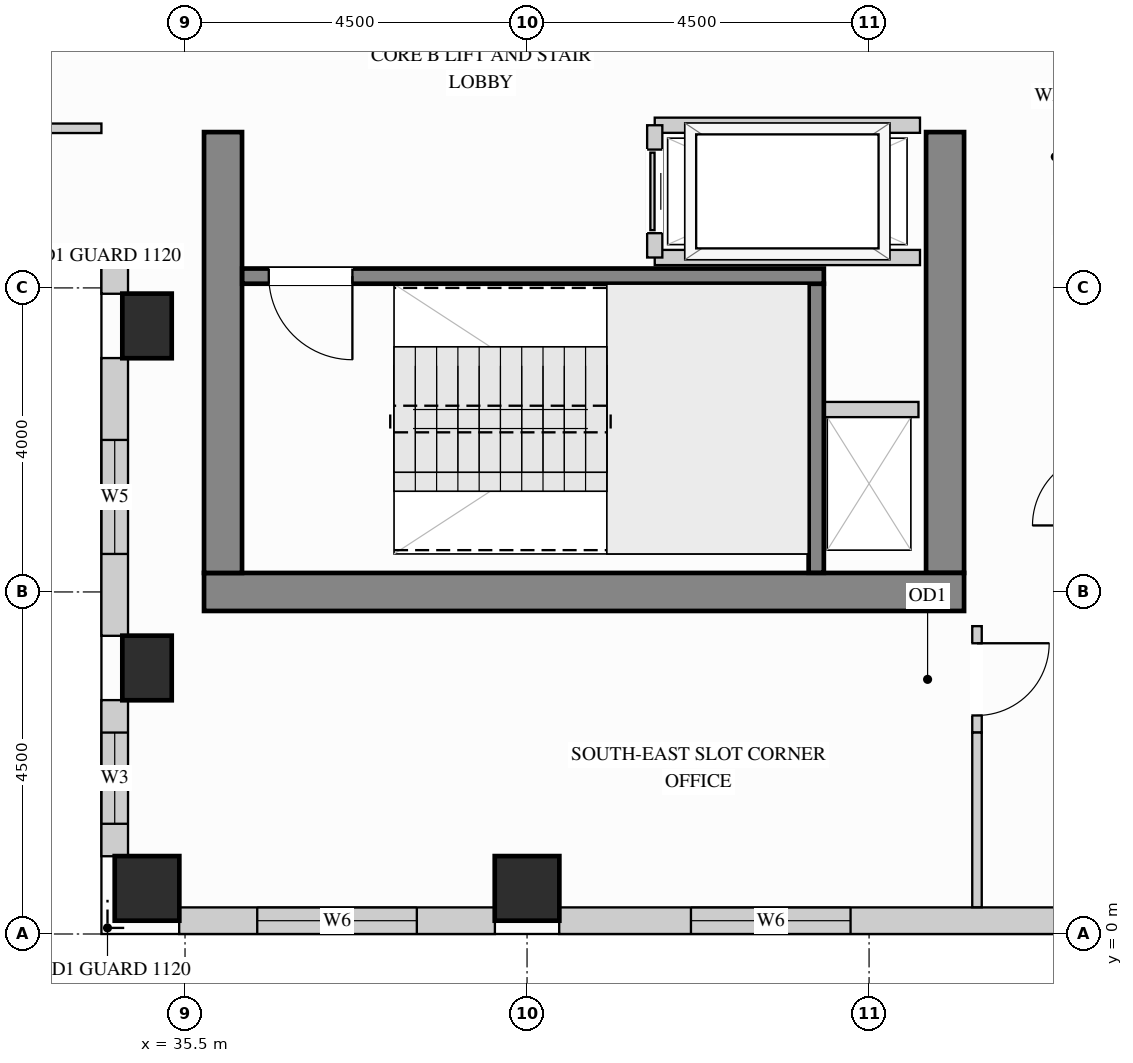
"""IFC4 building model, lengths in metres.
Left out: names, types, materials, properties, quantities, classifications, styles, units other than length and angle.
Written with IfcOpenShell. Run it as: python <this file> out.ifc"""

import sys

from ifc_helpers import new_model, si_unit, direction, frame, frame_2d, origin, origin_2d, place, context, subcontext, project, spatial, rectangle, extrude, source, transform, mapped, element, fill, save


model = new_model("IFC4")
c1 = context("Model", 3, precision=1e-05, world=origin(), true_north=direction((0.0, 1.0)))
c2 = subcontext(c1, "Body", "Model", "MODEL_VIEW")
j1 = project(units=[si_unit("LENGTHUNIT", "METRE"), si_unit("PLANEANGLEUNIT", "RADIAN")], contexts=[c1])
p1 = place(None, origin())
s1 = spatial("IfcSite", under=j1, at=p1, CompositionType="ELEMENT")
p2 = place(p1, origin())
s2 = spatial("IfcBuilding", under=s1, at=p2, CompositionType="ELEMENT")
p3 = place(p2, frame((0.0, 0.0, 241.2)))
s3 = spatial("IfcBuildingStorey", under=s2, at=p3, CompositionType="ELEMENT", Elevation=241.2)
m1 = source(origin(), c2, "Body", "SweptSolid", [
    extrude(rectangle(XDim=0.65, YDim=0.85, at=origin_2d()), origin(), (0.0, 0.0, 1.0), 3.4),
])
for number, where, z_axis, x_axis in (
    (1, (35.0, 3.5, 0.0), (0.0, 0.0, 1.0), (1.0, 0.0, 0.0)),
    (2, (35.0, 8.0, 0.0), (0.0, 0.0, 1.0), (1.0, 0.0, 0.0)),
):
    element("IfcColumn", number, at=place(p3, frame(where, z_axis=z_axis, x_axis=x_axis)), inside=s3, PredefinedType="COLUMN", context=c2, shape_type="MappedRepresentation", body=[
        mapped(m1, transform((0.0, 0.0, 0.0), x_axis=(1.0, 0.0, 0.0), y_axis=(0.0, 1.0, 0.0), z_axis=(0.0, 0.0, 1.0))),
    ])
m2 = source(origin(), c2, "Body", "SweptSolid", [
    extrude(rectangle(XDim=0.85, YDim=0.85, at=origin_2d()), origin(), (0.0, 0.0, 1.0), 3.4),
])
for number, where, z_axis, x_axis in (
    (3, (35.0, 0.6, 0.0), (0.0, 0.0, 1.0), (1.0, 0.0, 0.0)),
    (4, (40.0, 0.6, 0.0), (0.0, 0.0, 1.0), (1.0, 0.0, 0.0)),
):
    element("IfcColumn", number, at=place(p3, frame(where, z_axis=z_axis, x_axis=x_axis)), inside=s3, PredefinedType="COLUMN", context=c2, shape_type="MappedRepresentation", body=[
        mapped(m2, transform((0.0, 0.0, 0.0), x_axis=(1.0, 0.0, 0.0), y_axis=(0.0, 1.0, 0.0), z_axis=(0.0, 0.0, 1.0))),
    ])
m3 = source(origin(), c2, "Body", "SweptSolid", [
    extrude(rectangle(XDim=5.8, YDim=0.5, at=frame_2d((2.9, 0.0))), origin(), (0.0, 0.0, 1.0), 3.4),
])
p4 = place(p3, frame((45.5, 4.75, 0.0), z_axis=(0.0, 0.0, 1.0), x_axis=(0.0, 1.0, 0.0)))
e5 = element("IfcWall", 5, at=p4, inside=s3, PredefinedType="SHEAR", context=c2, shape_type="MappedRepresentation", body=[
    mapped(m3, transform((0.0, 0.0, 0.0), x_axis=(1.0, 0.0, 0.0), y_axis=(0.0, 1.0, 0.0), z_axis=(0.0, 0.0, 1.0))),
])
m4 = source(origin(), c2, "Body", "SweptSolid", [
    extrude(rectangle(XDim=10.0, YDim=0.5, at=frame_2d((5.0, 0.0))), origin(), (0.0, 0.0, 1.0), 3.4),
])
p5 = place(p3, frame((35.75, 4.5, 0.0), z_axis=(0.0, 0.0, 1.0), x_axis=(1.0, 0.0, 0.0)))
e6 = element("IfcWall", 6, at=p5, inside=s3, PredefinedType="SHEAR", context=c2, shape_type="MappedRepresentation", body=[
    mapped(m4, transform((0.0, 0.0, 0.0), x_axis=(1.0, 0.0, 0.0), y_axis=(0.0, 1.0, 0.0), z_axis=(0.0, 0.0, 1.0))),
])
p6 = place(p3, frame((36.0, 4.75, 0.0), z_axis=(0.0, 0.0, 1.0), x_axis=(0.0, 1.0, 0.0)))
e7 = element("IfcWall", 7, at=p6, inside=s3, PredefinedType="SHEAR", context=c2, shape_type="MappedRepresentation", body=[
    mapped(m3, transform((0.0, 0.0, 0.0), x_axis=(1.0, 0.0, 0.0), y_axis=(0.0, 1.0, 0.0), z_axis=(0.0, 0.0, 1.0))),
])
m5 = source(origin(), c2, "Body", "SweptSolid", [
    extrude(rectangle(XDim=0.379, YDim=0.35, at=frame_2d((0.189, 0.0))), origin(), (0.0, 0.0, 1.0), 3.385),
])
p7 = place(p3, frame((34.575, 8.802, 0.0), z_axis=(0.0, 0.0, 1.0), x_axis=(0.0, -1.0, 0.0)))
e8 = element("IfcWall", 8, at=p7, inside=s3, PredefinedType="SOLIDWALL", context=c2, shape_type="MappedRepresentation", body=[
    mapped(m5, transform((0.0, 0.0, 0.0), x_axis=(1.0, 0.0, 0.0), y_axis=(0.0, 1.0, 0.0), z_axis=(0.0, 0.0, 1.0))),
])
p8 = place(p3, frame((34.575, 7.577, 0.0), z_axis=(0.0, 0.0, 1.0), x_axis=(0.0, -1.0, 0.0)))
e9 = element("IfcWall", 9, at=p8, inside=s3, PredefinedType="SOLIDWALL", context=c2, shape_type="SweptSolid", body=[
    extrude(rectangle(XDim=3.654, YDim=0.35, at=frame_2d((1.827, 0.0))), origin(), (0.0, 0.0, 1.0), 3.385),
])
p9 = place(p8, frame((1.077, 0.0, 0.78)))
e10 = element("IfcOpeningElement", 10, at=p9, cuts=e9, PredefinedType="OPENING", context=c2, shape_type="SweptSolid", body=[
    extrude(rectangle(XDim=1.5, YDim=2.0, at=frame_2d((0.75, 1.0))), frame((0.0, 0.185, 0.0), z_axis=(0.0, -1.0, 0.0), x_axis=(1.0, 0.0, 0.0)), (0.0, 0.0, 1.0), 0.37),
])
p10 = place(p3, frame((34.575, 3.077, 0.0), z_axis=(0.0, 0.0, 1.0), x_axis=(0.0, -1.0, 0.0)))
e11 = element("IfcWall", 11, at=p10, inside=s3, PredefinedType="SOLIDWALL", context=c2, shape_type="SweptSolid", body=[
    extrude(rectangle(XDim=2.054, YDim=0.35, at=frame_2d((1.027, 0.0))), origin(), (0.0, 0.0, 1.0), 3.385),
])
p11 = place(p10, frame((0.427, 0.0, 0.78)))
e12 = element("IfcOpeningElement", 12, at=p11, cuts=e11, PredefinedType="OPENING", context=c2, shape_type="SweptSolid", body=[
    extrude(rectangle(XDim=1.2, YDim=2.0, at=frame_2d((0.6, 1.0))), frame((0.0, 0.185, 0.0), z_axis=(0.0, -1.0, 0.0), x_axis=(1.0, 0.0, 0.0)), (0.0, 0.0, 1.0), 0.37),
])
p12 = place(p3, frame((35.423, 0.175, 0.0), z_axis=(0.0, 0.0, 1.0), x_axis=(1.0, 0.0, 0.0)))
e13 = element("IfcWall", 13, at=p12, inside=s3, PredefinedType="SOLIDWALL", context=c2, shape_type="SweptSolid", body=[
    extrude(rectangle(XDim=4.154, YDim=0.35, at=frame_2d((2.077, 0.0))), origin(), (0.0, 0.0, 1.0), 3.385),
])
p13 = place(p12, frame((1.027, 0.0, 0.78)))
e14 = element("IfcOpeningElement", 14, at=p13, cuts=e13, PredefinedType="OPENING", context=c2, shape_type="SweptSolid", body=[
    extrude(rectangle(XDim=2.1, YDim=2.25, at=frame_2d((1.05, 1.125))), frame((0.0, 0.185, 0.0), z_axis=(0.0, -1.0, 0.0), x_axis=(1.0, 0.0, 0.0)), (0.0, 0.0, 1.0), 0.37),
])
p14 = place(p3, frame((40.423, 0.175, 0.0), z_axis=(0.0, 0.0, 1.0), x_axis=(1.0, 0.0, 0.0)))
e15 = element("IfcWall", 15, at=p14, inside=s3, PredefinedType="SOLIDWALL", context=c2, shape_type="SweptSolid", body=[
    extrude(rectangle(XDim=7.077, YDim=0.35, at=frame_2d((3.539, 0.0))), origin(), (0.0, 0.0, 1.0), 3.385),
])
p15 = place(p14, frame((1.733, 0.0, 0.78)))
e16 = element("IfcOpeningElement", 16, at=p15, cuts=e15, PredefinedType="OPENING", context=c2, shape_type="SweptSolid", body=[
    extrude(rectangle(XDim=2.1, YDim=2.25, at=frame_2d((1.05, 1.125))), frame((0.0, 0.185, 0.0), z_axis=(0.0, -1.0, 0.0), x_axis=(1.0, 0.0, 0.0)), (0.0, 0.0, 1.0), 0.37),
])
p16 = place(p3, frame((45.92, 2.65, 0.0), z_axis=(0.0, 0.0, 1.0), x_axis=(0.0, 1.0, 0.0)))
e17 = element("IfcWall", 17, at=p16, inside=s3, PredefinedType="PARTITIONING", context=c2, shape_type="SweptSolid", body=[
    extrude(rectangle(XDim=1.4, YDim=0.125, at=frame_2d((0.7, 0.0))), origin(), (0.0, 0.0, 1.0), 3.385),
])
p17 = place(p16, frame((0.225, 0.0, 0.0)))
e18 = element("IfcOpeningElement", 18, at=p17, cuts=e17, PredefinedType="OPENING", context=c2, shape_type="SweptSolid", body=[
    extrude(rectangle(XDim=0.95, YDim=2.15, at=frame_2d((0.475, 1.075))), frame((0.0, 0.073, 0.0), z_axis=(0.0, -1.0, 0.0), x_axis=(1.0, 0.0, 0.0)), (0.0, 0.0, 1.0), 0.145),
])
m6 = source(origin(), c2, "Body", "SweptSolid", [
    extrude(rectangle(XDim=2.298, YDim=0.125, at=frame_2d((1.149, 0.0))), origin(), (0.0, 0.0, 1.0), 3.385),
])
p18 = place(p3, frame((45.92, 0.352, 0.0), z_axis=(0.0, 0.0, 1.0), x_axis=(0.0, 1.0, 0.0)))
e19 = element("IfcWall", 19, at=p18, inside=s3, PredefinedType="PARTITIONING", context=c2, shape_type="MappedRepresentation", body=[
    mapped(m6, transform((0.0, 0.0, 0.0), x_axis=(1.0, 0.0, 0.0), y_axis=(0.0, 1.0, 0.0), z_axis=(0.0, 0.0, 1.0))),
])
p19 = place(p3, frame((29.85, 10.6, 0.0), z_axis=(0.0, 0.0, 1.0), x_axis=(1.0, 0.0, 0.0)))
e20 = element("IfcWall", 20, at=p19, inside=s3, PredefinedType="PARTITIONING", context=c2, shape_type="SweptSolid", body=[
    extrude(rectangle(XDim=4.55, YDim=0.125, at=frame_2d((2.275, 0.0))), origin(), (0.0, 0.0, 1.0), 3.385),
])
p20 = place(p19, frame((1.8, 0.0, 0.0)))
e21 = element("IfcOpeningElement", 21, at=p20, cuts=e20, PredefinedType="OPENING", context=c2, shape_type="SweptSolid", body=[
    extrude(rectangle(XDim=0.95, YDim=2.15, at=frame_2d((0.475, 1.075))), frame((0.0, 0.073, 0.0), z_axis=(0.0, -1.0, 0.0), x_axis=(1.0, 0.0, 0.0)), (0.0, 0.0, 1.0), 0.145),
])
m7 = source(origin(), c2, "Body", "SweptSolid", [
    extrude(rectangle(XDim=1.3, YDim=0.2, at=frame_2d((0.65, 0.0))), origin(), (0.0, 0.0, 1.0), 3.385),
])
p21 = place(p3, frame((43.85, 6.9, 0.0), z_axis=(0.0, 0.0, 1.0), x_axis=(1.0, 0.0, 0.0)))
e22 = element("IfcWall", 22, at=p21, inside=s3, PredefinedType="PARTITIONING", context=c2, shape_type="MappedRepresentation", body=[
    mapped(m7, transform((0.0, 0.0, 0.0), x_axis=(1.0, 0.0, 0.0), y_axis=(0.0, 1.0, 0.0), z_axis=(0.0, 0.0, 1.0))),
])
m8 = source(origin(), c2, "Body", "SweptSolid", [
    extrude(rectangle(XDim=3.49, YDim=0.2, at=frame_2d((1.745, 0.0))), origin(), (0.0, 0.0, 1.0), 3.385),
])
for number, where, z_axis, x_axis in (
    (23, (41.68, 10.64, 0.0), (0.0, 0.0, 1.0), (1.0, 0.0, 0.0)),
    (24, (41.68, 8.9, 0.0), (0.0, 0.0, 1.0), (1.0, 0.0, 0.0)),
):
    element("IfcWall", number, at=place(p3, frame(where, z_axis=z_axis, x_axis=x_axis)), inside=s3, PredefinedType="PARTITIONING", context=c2, shape_type="MappedRepresentation", body=[
        mapped(m8, transform((0.0, 0.0, 0.0), x_axis=(1.0, 0.0, 0.0), y_axis=(0.0, 1.0, 0.0), z_axis=(0.0, 0.0, 1.0))),
    ])
p22 = place(p3, frame((41.68, 8.9, 0.0), z_axis=(0.0, 0.0, 1.0), x_axis=(0.0, 1.0, 0.0)))
e25 = element("IfcWall", 25, at=p22, inside=s3, PredefinedType="PARTITIONING", context=c2, shape_type="SweptSolid", body=[
    extrude(rectangle(XDim=1.74, YDim=0.2, at=frame_2d((0.87, 0.0))), origin(), (0.0, 0.0, 1.0), 3.385),
])
p23 = place(p22, frame((0.32, 0.0, 0.0)))
e26 = element("IfcOpeningElement", 26, at=p23, cuts=e25, PredefinedType="OPENING", context=c2, shape_type="SweptSolid", body=[
    extrude(rectangle(XDim=1.1, YDim=2.2, at=frame_2d((0.55, 1.1))), frame((0.0, 0.11, 0.0), z_axis=(0.0, -1.0, 0.0), x_axis=(1.0, 0.0, 0.0)), (0.0, 0.0, 1.0), 0.22),
])
m9 = source(origin(), c2, "Body", "SweptSolid", [
    extrude(rectangle(XDim=3.803, YDim=0.2, at=frame_2d((1.901, 0.0))), origin(), (0.0, 0.0, 1.0), 3.4),
])
p24 = place(p3, frame((43.805, 4.752, 0.0), z_axis=(0.0, 0.0, 1.0), x_axis=(0.0, 1.0, 0.0)))
e27 = element("IfcWall", 27, at=p24, inside=s3, PredefinedType="SHEAR", context=c2, shape_type="MappedRepresentation", body=[
    mapped(m9, transform((0.0, 0.0, 0.0), x_axis=(1.0, 0.0, 0.0), y_axis=(0.0, 1.0, 0.0), z_axis=(0.0, 0.0, 1.0))),
])
p25 = place(p3, frame((36.252, 8.655, 0.0), z_axis=(0.0, 0.0, 1.0), x_axis=(1.0, 0.0, 0.0)))
e28 = element("IfcWall", 28, at=p25, inside=s3, PredefinedType="SHEAR", context=c2, shape_type="SweptSolid", body=[
    extrude(rectangle(XDim=7.653, YDim=0.2, at=frame_2d((3.827, 0.0))), origin(), (0.0, 0.0, 1.0), 3.4),
])
p26 = place(p25, frame((0.35, 0.0, 0.0)))
e29 = element("IfcOpeningElement", 29, at=p26, cuts=e28, PredefinedType="OPENING", context=c2, shape_type="SweptSolid", body=[
    extrude(rectangle(XDim=1.1, YDim=2.15, at=frame_2d((0.55, 1.075))), frame((0.0, 0.11, 0.0), z_axis=(0.0, -1.0, 0.0), x_axis=(1.0, 0.0, 0.0)), (0.0, 0.0, 1.0), 0.22),
])
m10 = source(origin(), c2, "Body", "SweptSolid", [
    extrude(rectangle(XDim=1.1, YDim=2.2, at=frame_2d((0.55, 1.1))), frame((0.0, 0.025, 0.0), z_axis=(0.0, -1.0, 0.0), x_axis=(1.0, 0.0, 0.0)), (0.0, 0.0, 1.0), 0.05),
])
p27 = place(p23, origin())
e30 = element("IfcDoor", 30, at=p27, inside=s3, OperationType="SLIDING_TO_LEFT", PredefinedType="DOOR", context=c2, shape_type="MappedRepresentation", body=[
    mapped(m10, transform((0.0, 0.0, 0.0), x_axis=(1.0, 0.0, 0.0), y_axis=(0.0, 1.0, 0.0), z_axis=(0.0, 0.0, 1.0))),
])
fill(e26, e30)
m11 = source(origin(), c2, "Body", "SweptSolid", [
    extrude(rectangle(XDim=0.95, YDim=2.15, at=frame_2d((0.475, 1.075))), frame((0.0, 0.025, 0.0), z_axis=(0.0, -1.0, 0.0), x_axis=(1.0, 0.0, 0.0)), (0.0, 0.0, 1.0), 0.05),
])
p28 = place(p17, origin())
e31 = element("IfcDoor", 31, at=p28, inside=s3, OperationType="SINGLE_SWING_RIGHT", PredefinedType="DOOR", context=c2, shape_type="MappedRepresentation", body=[
    mapped(m11, transform((0.0, 0.0, 0.0), x_axis=(1.0, 0.0, 0.0), y_axis=(0.0, 1.0, 0.0), z_axis=(0.0, 0.0, 1.0))),
])
fill(e18, e31)
m12 = source(origin(), c2, "Body", "SweptSolid", [
    extrude(rectangle(XDim=1.1, YDim=2.15, at=frame_2d((0.55, 1.075))), frame((0.0, 0.025, 0.0), z_axis=(0.0, -1.0, 0.0), x_axis=(1.0, 0.0, 0.0)), (0.0, 0.0, 1.0), 0.05),
])
p29 = place(p26, origin())
e32 = element("IfcDoor", 32, at=p29, inside=s3, OperationType="SINGLE_SWING_RIGHT", PredefinedType="DOOR", context=c2, shape_type="MappedRepresentation", body=[
    mapped(m12, transform((0.0, 0.0, 0.0), x_axis=(1.0, 0.0, 0.0), y_axis=(0.0, 1.0, 0.0), z_axis=(0.0, 0.0, 1.0))),
])
fill(e29, e32)
m13 = source(origin(), c2, "Body", "SweptSolid", [
    extrude(rectangle(XDim=1.2, YDim=2.0, at=frame_2d((0.6, 1.0))), frame((0.0, 0.03, 0.0), z_axis=(0.0, -1.0, 0.0), x_axis=(1.0, 0.0, 0.0)), (0.0, 0.0, 1.0), 0.06),
])
p30 = place(p11, origin())
e33 = element("IfcWindow", 33, at=p30, inside=s3, PartitioningType="SINGLE_PANEL", PredefinedType="WINDOW", context=c2, shape_type="MappedRepresentation", body=[
    mapped(m13, transform((0.0, 0.0, 0.0), x_axis=(1.0, 0.0, 0.0), y_axis=(0.0, 1.0, 0.0), z_axis=(0.0, 0.0, 1.0))),
])
fill(e12, e33)
m14 = source(origin(), c2, "Body", "SweptSolid", [
    extrude(rectangle(XDim=1.5, YDim=2.0, at=frame_2d((0.75, 1.0))), frame((0.0, 0.03, 0.0), z_axis=(0.0, -1.0, 0.0), x_axis=(1.0, 0.0, 0.0)), (0.0, 0.0, 1.0), 0.06),
])
p31 = place(p9, origin())
e34 = element("IfcWindow", 34, at=p31, inside=s3, PartitioningType="SINGLE_PANEL", PredefinedType="WINDOW", context=c2, shape_type="MappedRepresentation", body=[
    mapped(m14, transform((0.0, 0.0, 0.0), x_axis=(1.0, 0.0, 0.0), y_axis=(0.0, 1.0, 0.0), z_axis=(0.0, 0.0, 1.0))),
])
fill(e10, e34)
m15 = source(origin(), c2, "Body", "SweptSolid", [
    extrude(rectangle(XDim=2.1, YDim=2.25, at=frame_2d((1.05, 1.125))), frame((0.0, 0.03, 0.0), z_axis=(0.0, -1.0, 0.0), x_axis=(1.0, 0.0, 0.0)), (0.0, 0.0, 1.0), 0.06),
])
p32 = place(p13, origin())
e35 = element("IfcWindow", 35, at=p32, inside=s3, PartitioningType="SINGLE_PANEL", PredefinedType="WINDOW", context=c2, shape_type="MappedRepresentation", body=[
    mapped(m15, transform((0.0, 0.0, 0.0), x_axis=(1.0, 0.0, 0.0), y_axis=(0.0, 1.0, 0.0), z_axis=(0.0, 0.0, 1.0))),
])
fill(e14, e35)
p33 = place(p15, origin())
e36 = element("IfcWindow", 36, at=p33, inside=s3, PartitioningType="SINGLE_PANEL", PredefinedType="WINDOW", context=c2, shape_type="MappedRepresentation", body=[
    mapped(m15, transform((0.0, 0.0, 0.0), x_axis=(1.0, 0.0, 0.0), y_axis=(0.0, 1.0, 0.0), z_axis=(0.0, 0.0, 1.0))),
])
fill(e16, e36)
save(model, sys.argv[1])
